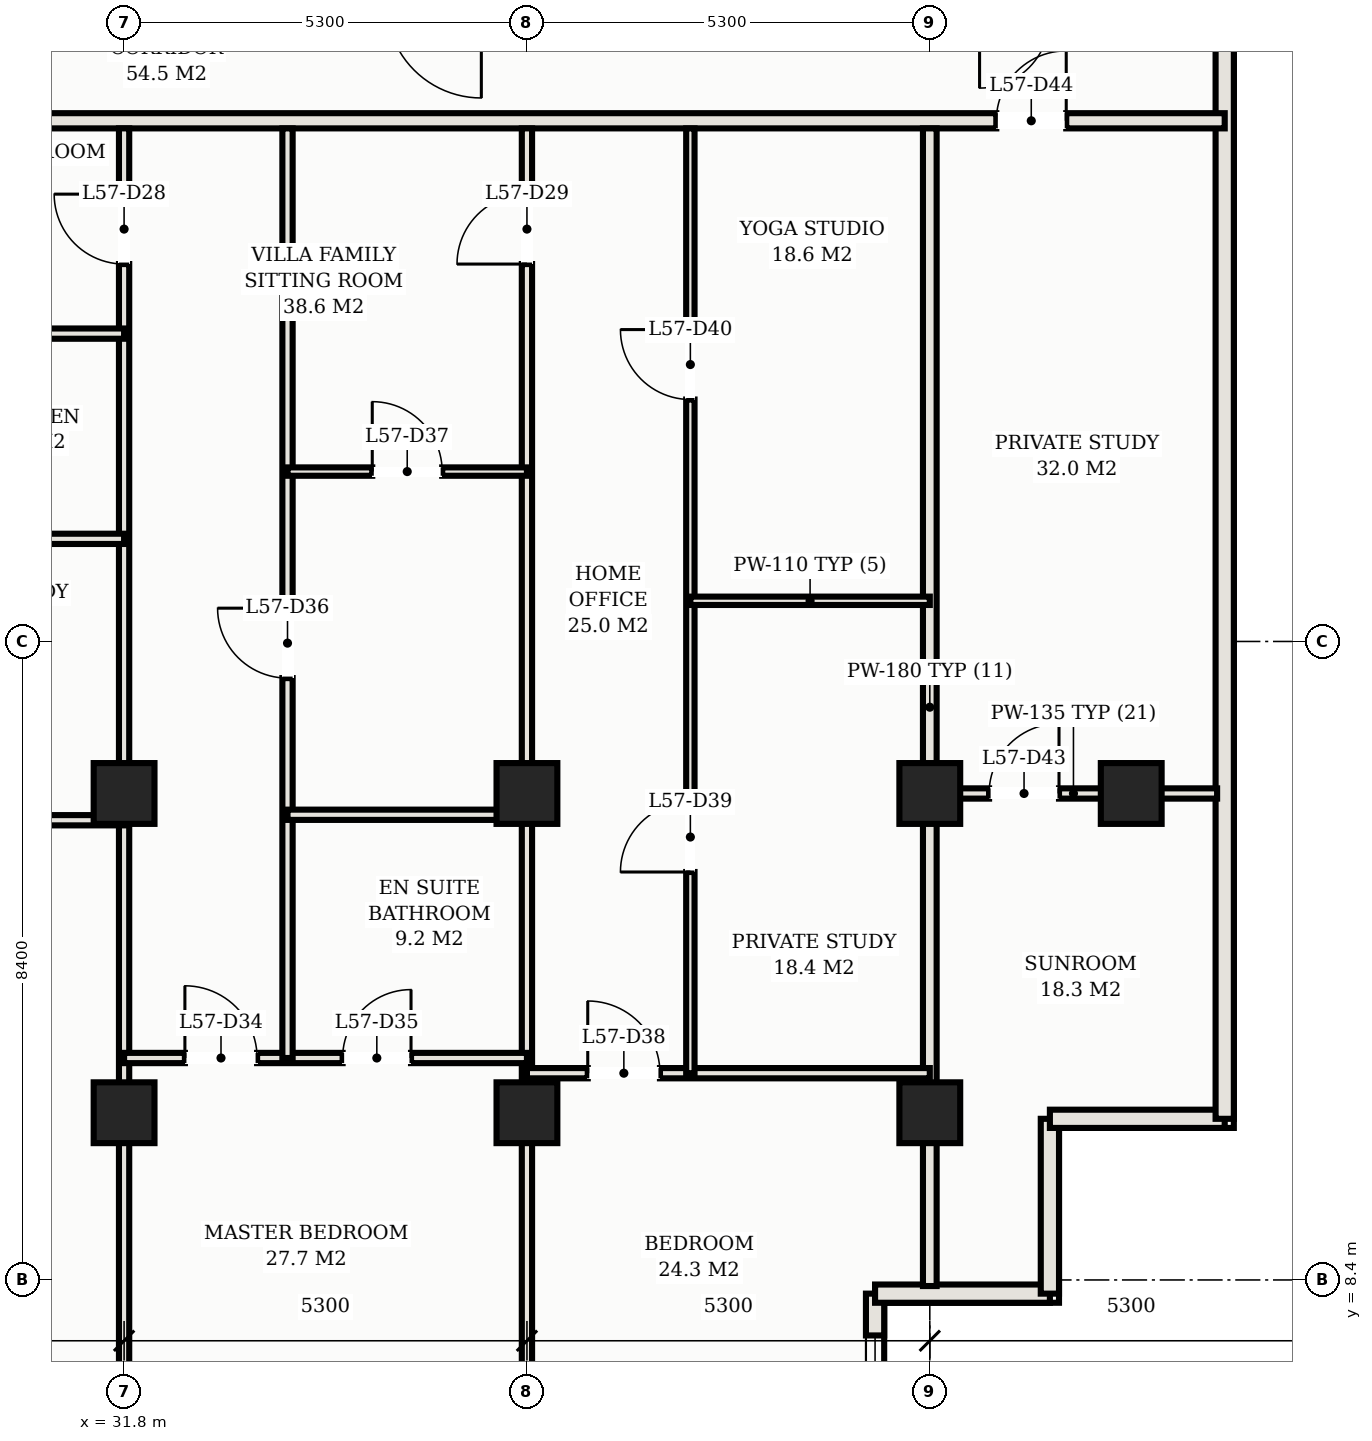
"""IFC4 building model, lengths in metres.
Left out: names, types, materials, properties, quantities, classifications, styles, units other than length and angle.
Written with IfcOpenShell. Run it as: python <this file> out.ifc"""

import sys

from ifc_helpers import new_model, si_unit, direction, frame, frame_2d, origin, origin_2d, place, context, subcontext, project, spatial, rectangle, hollow_rectangle, extrude, element, fill, save


model = new_model("IFC4")
c1 = context("Model", 3, precision=1e-05, world=origin(), true_north=direction((0.0, 1.0)))
c2 = subcontext(c1, "Body", "Model", "MODEL_VIEW")
j1 = project(units=[si_unit("LENGTHUNIT", "METRE"), si_unit("PLANEANGLEUNIT", "RADIAN")], contexts=[c1])
p1 = place(None, origin())
s1 = spatial("IfcSite", under=j1, at=p1, CompositionType="ELEMENT")
p2 = place(p1, origin())
s2 = spatial("IfcBuilding", under=s1, at=p2, CompositionType="ELEMENT")
p3 = place(p2, frame((0.0, 0.0, 209.9)))
s3 = spatial("IfcBuildingStorey", under=s2, at=p3, CompositionType="ELEMENT", Elevation=209.9)
for number, where, z_axis, x_axis in (
    (1, (31.8, 14.8, 0.0), (0.0, 0.0, 1.0), (1.0, 0.0, 0.0)),
    (2, (31.8, 10.6, 0.0), (0.0, 0.0, 1.0), (1.0, 0.0, 0.0)),
    (3, (37.1, 14.8, 0.0), (0.0, 0.0, 1.0), (1.0, 0.0, 0.0)),
    (4, (37.1, 10.6, 0.0), (0.0, 0.0, 1.0), (1.0, 0.0, 0.0)),
    (5, (42.4, 14.8, 0.0), (0.0, 0.0, 1.0), (1.0, 0.0, 0.0)),
    (6, (42.4, 10.6, 0.0), (0.0, 0.0, 1.0), (1.0, 0.0, 0.0)),
    (7, (45.05, 14.8, 0.0), (0.0, 0.0, 1.0), (1.0, 0.0, 0.0)),
):
    element("IfcColumn", number, at=place(p3, frame(where, z_axis=z_axis, x_axis=x_axis)), inside=s3, PredefinedType="COLUMN", context=c2, shape_type="SweptSolid", body=[
        extrude(hollow_rectangle(XDim=0.8, YDim=0.8, WallThickness=0.028, at=origin_2d()), origin(), (0.0, 0.0, 1.0), 3.3),
    ])
p4 = place(p3, frame((41.68, 5.92, 0.0), z_axis=(0.0, 0.0, 1.0), x_axis=(0.0, 1.0, 0.0)))
e8 = element("IfcWall", 8, at=p4, inside=s3, PredefinedType="SOLIDWALL", context=c2, shape_type="SweptSolid", body=[
    extrude(rectangle(XDim=2.3, YDim=0.24, at=frame_2d((1.15, 0.0))), origin(), (0.0, 0.0, 1.0), 3.11),
])
p5 = place(p4, frame((0.55, 0.0, 0.75)))
e9 = element("IfcOpeningElement", 9, at=p5, cuts=e8, PredefinedType="OPENING", context=c2, shape_type="SweptSolid", body=[
    extrude(rectangle(XDim=1.2, YDim=1.5, at=frame_2d((0.6, 0.75))), frame((0.0, 0.13, 0.0), z_axis=(0.0, -1.0, 0.0), x_axis=(1.0, 0.0, 0.0)), (0.0, 0.0, 1.0), 0.26),
])
for number, where, z_axis, x_axis in (
    (10, (41.68, 8.22, 0.0), (0.0, 0.0, 1.0), (1.0, 0.0, 0.0)),
    (11, (43.98, 8.22, 0.0), (0.0, 0.0, 1.0), (0.0, 1.0, 0.0)),
    (12, (43.98, 10.52, 0.0), (0.0, 0.0, 1.0), (1.0, 0.0, 0.0)),
):
    element("IfcWall", number, at=place(p3, frame(where, z_axis=z_axis, x_axis=x_axis)), inside=s3, PredefinedType="SOLIDWALL", context=c2, shape_type="SweptSolid", body=[
        extrude(rectangle(XDim=2.3, YDim=0.24, at=frame_2d((1.15, 0.0))), origin(), (0.0, 0.0, 1.0), 3.11),
    ])
p6 = place(p3, frame((46.28, 10.52, 0.0), z_axis=(0.0, 0.0, 1.0), x_axis=(0.0, 1.0, 0.0)))
e13 = element("IfcWall", 13, at=p6, inside=s3, PredefinedType="SOLIDWALL", context=c2, shape_type="SweptSolid", body=[
    extrude(rectangle(XDim=26.41, YDim=0.24, at=frame_2d((13.205, 0.0))), origin(), (0.0, 0.0, 1.0), 3.11),
])
p7 = place(p6, frame((17.48, 0.0, 0.0)))
e14 = element("IfcOpeningElement", 14, at=p7, cuts=e13, PredefinedType="OPENING", context=c2, shape_type="SweptSolid", body=[
    extrude(rectangle(XDim=1.8, YDim=2.2, at=frame_2d((0.9, 1.1))), frame((0.0, 0.13, 0.0), z_axis=(0.0, -1.0, 0.0), x_axis=(1.0, 0.0, 0.0)), (0.0, 0.0, 1.0), 0.26),
])
p8 = place(p3, frame((6.72, 23.65, 0.0), z_axis=(0.0, 0.0, 1.0), x_axis=(1.0, 0.0, 0.0)))
e15 = element("IfcWall", 15, at=p8, inside=s3, PredefinedType="PARTITIONING", context=c2, shape_type="SweptSolid", body=[
    extrude(rectangle(XDim=39.56, YDim=0.2, at=frame_2d((19.78, 0.0))), origin(), (0.0, 0.0, 1.0), 2.43),
])
p9 = place(p8, frame((4.63, 0.0, 0.0)))
e16 = element("IfcOpeningElement", 16, at=p9, cuts=e15, PredefinedType="OPENING", context=c2, shape_type="SweptSolid", body=[
    extrude(rectangle(XDim=1.1, YDim=2.25, at=frame_2d((0.55, 1.125))), frame((0.0, 0.11, 0.0), z_axis=(0.0, -1.0, 0.0), x_axis=(1.0, 0.0, 0.0)), (0.0, 0.0, 1.0), 0.22),
])
p10 = place(p8, frame((20.53, 0.0, 0.0)))
e17 = element("IfcOpeningElement", 17, at=p10, cuts=e15, PredefinedType="OPENING", context=c2, shape_type="SweptSolid", body=[
    extrude(rectangle(XDim=1.1, YDim=2.25, at=frame_2d((0.55, 1.125))), frame((0.0, 0.11, 0.0), z_axis=(0.0, -1.0, 0.0), x_axis=(1.0, 0.0, 0.0)), (0.0, 0.0, 1.0), 0.22),
])
p11 = place(p8, frame((2.085, 0.0, 0.0)))
e18 = element("IfcOpeningElement", 18, at=p11, cuts=e15, PredefinedType="OPENING", context=c2, shape_type="SweptSolid", body=[
    extrude(rectangle(XDim=0.92, YDim=2.15, at=frame_2d((0.46, 1.075))), frame((0.0, 0.11, 0.0), z_axis=(0.0, -1.0, 0.0), x_axis=(1.0, 0.0, 0.0)), (0.0, 0.0, 1.0), 0.22),
])
p12 = place(p8, frame((36.555, 0.0, 0.0)))
e19 = element("IfcOpeningElement", 19, at=p12, cuts=e15, PredefinedType="OPENING", context=c2, shape_type="SweptSolid", body=[
    extrude(rectangle(XDim=0.92, YDim=2.15, at=frame_2d((0.46, 1.075))), frame((0.0, 0.11, 0.0), z_axis=(0.0, -1.0, 0.0), x_axis=(1.0, 0.0, 0.0)), (0.0, 0.0, 1.0), 0.22),
])
p13 = place(p3, frame((42.4, 8.32, 0.0), z_axis=(0.0, 0.0, 1.0), x_axis=(0.0, 1.0, 0.0)))
e20 = element("IfcWall", 20, at=p13, inside=s3, PredefinedType="PARTITIONING", context=c2, shape_type="SweptSolid", body=[
    extrude(rectangle(XDim=15.23, YDim=0.18, at=frame_2d((7.615, 0.0))), origin(), (0.0, 0.0, 1.0), 2.43),
])
p14 = place(p3, frame((31.8, 5.331, 0.0), z_axis=(0.0, 0.0, 1.0), x_axis=(0.0, 1.0, 0.0)))
e21 = element("IfcWall", 21, at=p14, inside=s3, PredefinedType="PARTITIONING", context=c2, shape_type="SweptSolid", body=[
    extrude(rectangle(XDim=18.219, YDim=0.135, at=frame_2d((9.109, 0.0))), origin(), (0.0, 0.0, 1.0), 2.43),
])
p15 = place(p14, frame((16.434, 0.0, 0.0)))
e22 = element("IfcOpeningElement", 22, at=p15, cuts=e21, PredefinedType="OPENING", context=c2, shape_type="SweptSolid", body=[
    extrude(rectangle(XDim=0.92, YDim=2.15, at=frame_2d((0.46, 1.075))), frame((0.0, 0.078, 0.0), z_axis=(0.0, -1.0, 0.0), x_axis=(1.0, 0.0, 0.0)), (0.0, 0.0, 1.0), 0.155),
])
p16 = place(p3, frame((37.1, 6.02, 0.0), z_axis=(0.0, 0.0, 1.0), x_axis=(0.0, 1.0, 0.0)))
e23 = element("IfcWall", 23, at=p16, inside=s3, PredefinedType="PARTITIONING", context=c2, shape_type="SweptSolid", body=[
    extrude(rectangle(XDim=17.53, YDim=0.135, at=frame_2d((8.765, 0.0))), origin(), (0.0, 0.0, 1.0), 2.43),
])
p17 = place(p16, frame((15.745, 0.0, 0.0)))
e24 = element("IfcOpeningElement", 24, at=p17, cuts=e23, PredefinedType="OPENING", context=c2, shape_type="SweptSolid", body=[
    extrude(rectangle(XDim=0.92, YDim=2.15, at=frame_2d((0.46, 1.075))), frame((0.0, 0.078, 0.0), z_axis=(0.0, -1.0, 0.0), x_axis=(1.0, 0.0, 0.0)), (0.0, 0.0, 1.0), 0.155),
])
p18 = place(p3, frame((26.5, 14.448, 0.0), z_axis=(0.0, 0.0, 1.0), x_axis=(1.0, 0.0, 0.0)))
e25 = element("IfcWall", 25, at=p18, inside=s3, PredefinedType="PARTITIONING", context=c2, shape_type="SweptSolid", body=[
    extrude(rectangle(XDim=5.3, YDim=0.135, at=frame_2d((2.65, 0.0))), origin(), (0.0, 0.0, 1.0), 2.43),
])
p19 = place(p18, frame((0.815, 0.0, 0.0)))
e26 = element("IfcOpeningElement", 26, at=p19, cuts=e25, PredefinedType="OPENING", context=c2, shape_type="SweptSolid", body=[
    extrude(rectangle(XDim=0.92, YDim=2.15, at=frame_2d((0.46, 1.075))), frame((0.0, 0.078, 0.0), z_axis=(0.0, -1.0, 0.0), x_axis=(1.0, 0.0, 0.0)), (0.0, 0.0, 1.0), 0.155),
])
for number, where, z_axis, x_axis in (
    (27, (28.65, 18.15, 0.0), (0.0, 0.0, 1.0), (1.0, 0.0, 0.0)),
    (28, (28.65, 20.85, 0.0), (0.0, 0.0, 1.0), (1.0, 0.0, 0.0)),
):
    element("IfcWall", number, at=place(p3, frame(where, z_axis=z_axis, x_axis=x_axis)), inside=s3, PredefinedType="PARTITIONING", context=c2, shape_type="SweptSolid", body=[
        extrude(rectangle(XDim=3.15, YDim=0.135, at=frame_2d((1.575, 0.0))), origin(), (0.0, 0.0, 1.0), 2.43),
    ])
p20 = place(p3, frame((31.8, 11.32, 0.0), z_axis=(0.0, 0.0, 1.0), x_axis=(1.0, 0.0, 0.0)))
e29 = element("IfcWall", 29, at=p20, inside=s3, PredefinedType="PARTITIONING", context=c2, shape_type="SweptSolid", body=[
    extrude(rectangle(XDim=5.3, YDim=0.135, at=frame_2d((2.65, 0.0))), origin(), (0.0, 0.0, 1.0), 2.43),
])
p21 = place(p20, frame((0.8, 0.0, 0.0)))
e30 = element("IfcOpeningElement", 30, at=p21, cuts=e29, PredefinedType="OPENING", context=c2, shape_type="SweptSolid", body=[
    extrude(rectangle(XDim=0.95, YDim=2.15, at=frame_2d((0.475, 1.075))), frame((0.0, 0.078, 0.0), z_axis=(0.0, -1.0, 0.0), x_axis=(1.0, 0.0, 0.0)), (0.0, 0.0, 1.0), 0.155),
])
p22 = place(p20, frame((2.875, 0.0, 0.0)))
e31 = element("IfcOpeningElement", 31, at=p22, cuts=e29, PredefinedType="OPENING", context=c2, shape_type="SweptSolid", body=[
    extrude(rectangle(XDim=0.9, YDim=2.15, at=frame_2d((0.45, 1.075))), frame((0.0, 0.078, 0.0), z_axis=(0.0, -1.0, 0.0), x_axis=(1.0, 0.0, 0.0)), (0.0, 0.0, 1.0), 0.155),
])
p23 = place(p3, frame((33.95, 11.32, 0.0), z_axis=(0.0, 0.0, 1.0), x_axis=(0.0, 1.0, 0.0)))
e32 = element("IfcWall", 32, at=p23, inside=s3, PredefinedType="PARTITIONING", context=c2, shape_type="SweptSolid", body=[
    extrude(rectangle(XDim=12.23, YDim=0.135, at=frame_2d((6.115, 0.0))), origin(), (0.0, 0.0, 1.0), 2.43),
])
p24 = place(p23, frame((4.998, 0.0, 0.0)))
e33 = element("IfcOpeningElement", 33, at=p24, cuts=e32, PredefinedType="OPENING", context=c2, shape_type="SweptSolid", body=[
    extrude(rectangle(XDim=0.92, YDim=2.15, at=frame_2d((0.46, 1.075))), frame((0.0, 0.078, 0.0), z_axis=(0.0, -1.0, 0.0), x_axis=(1.0, 0.0, 0.0)), (0.0, 0.0, 1.0), 0.155),
])
p25 = place(p3, frame((33.95, 14.52, 0.0), z_axis=(0.0, 0.0, 1.0), x_axis=(1.0, 0.0, 0.0)))
e34 = element("IfcWall", 34, at=p25, inside=s3, PredefinedType="PARTITIONING", context=c2, shape_type="SweptSolid", body=[
    extrude(rectangle(XDim=3.15, YDim=0.135, at=frame_2d((1.575, 0.0))), origin(), (0.0, 0.0, 1.0), 2.43),
])
p26 = place(p3, frame((33.95, 19.035, 0.0), z_axis=(0.0, 0.0, 1.0), x_axis=(1.0, 0.0, 0.0)))
e35 = element("IfcWall", 35, at=p26, inside=s3, PredefinedType="MOVABLE", context=c2, shape_type="SweptSolid", body=[
    extrude(rectangle(XDim=3.15, YDim=0.11, at=frame_2d((1.575, 0.0))), origin(), (0.0, 0.0, 1.0), 2.43),
])
p27 = place(p26, frame((1.115, 0.0, 0.0)))
e36 = element("IfcOpeningElement", 36, at=p27, cuts=e35, PredefinedType="OPENING", context=c2, shape_type="SweptSolid", body=[
    extrude(rectangle(XDim=0.92, YDim=2.15, at=frame_2d((0.46, 1.075))), frame((0.0, 0.065, 0.0), z_axis=(0.0, -1.0, 0.0), x_axis=(1.0, 0.0, 0.0)), (0.0, 0.0, 1.0), 0.13),
])
p28 = place(p3, frame((37.1, 11.12, 0.0), z_axis=(0.0, 0.0, 1.0), x_axis=(1.0, 0.0, 0.0)))
e37 = element("IfcWall", 37, at=p28, inside=s3, PredefinedType="PARTITIONING", context=c2, shape_type="SweptSolid", body=[
    extrude(rectangle(XDim=5.3, YDim=0.135, at=frame_2d((2.65, 0.0))), origin(), (0.0, 0.0, 1.0), 2.43),
])
p29 = place(p28, frame((0.8, 0.0, 0.0)))
e38 = element("IfcOpeningElement", 38, at=p29, cuts=e37, PredefinedType="OPENING", context=c2, shape_type="SweptSolid", body=[
    extrude(rectangle(XDim=0.95, YDim=2.15, at=frame_2d((0.475, 1.075))), frame((0.0, 0.078, 0.0), z_axis=(0.0, -1.0, 0.0), x_axis=(1.0, 0.0, 0.0)), (0.0, 0.0, 1.0), 0.155),
])
p30 = place(p3, frame((39.25, 11.12, 0.0), z_axis=(0.0, 0.0, 1.0), x_axis=(0.0, 1.0, 0.0)))
e39 = element("IfcWall", 39, at=p30, inside=s3, PredefinedType="MOVABLE", context=c2, shape_type="SweptSolid", body=[
    extrude(rectangle(XDim=12.43, YDim=0.11, at=frame_2d((6.215, 0.0))), origin(), (0.0, 0.0, 1.0), 2.43),
])
p31 = place(p30, frame((2.647, 0.0, 0.0)))
e40 = element("IfcOpeningElement", 40, at=p31, cuts=e39, PredefinedType="OPENING", context=c2, shape_type="SweptSolid", body=[
    extrude(rectangle(XDim=0.92, YDim=2.15, at=frame_2d((0.46, 1.075))), frame((0.0, 0.065, 0.0), z_axis=(0.0, -1.0, 0.0), x_axis=(1.0, 0.0, 0.0)), (0.0, 0.0, 1.0), 0.13),
])
p32 = place(p30, frame((8.863, 0.0, 0.0)))
e41 = element("IfcOpeningElement", 41, at=p32, cuts=e39, PredefinedType="OPENING", context=c2, shape_type="SweptSolid", body=[
    extrude(rectangle(XDim=0.92, YDim=2.15, at=frame_2d((0.46, 1.075))), frame((0.0, 0.065, 0.0), z_axis=(0.0, -1.0, 0.0), x_axis=(1.0, 0.0, 0.0)), (0.0, 0.0, 1.0), 0.13),
])
p33 = place(p3, frame((39.25, 17.335, 0.0), z_axis=(0.0, 0.0, 1.0), x_axis=(1.0, 0.0, 0.0)))
e42 = element("IfcWall", 42, at=p33, inside=s3, PredefinedType="MOVABLE", context=c2, shape_type="SweptSolid", body=[
    extrude(rectangle(XDim=3.15, YDim=0.11, at=frame_2d((1.575, 0.0))), origin(), (0.0, 0.0, 1.0), 2.43),
])
p34 = place(p3, frame((42.4, 14.8, 0.0), z_axis=(0.0, 0.0, 1.0), x_axis=(1.0, 0.0, 0.0)))
e43 = element("IfcWall", 43, at=p34, inside=s3, PredefinedType="PARTITIONING", context=c2, shape_type="SweptSolid", body=[
    extrude(rectangle(XDim=3.78, YDim=0.135, at=frame_2d((1.89, 0.0))), origin(), (0.0, 0.0, 1.0), 2.43),
])
p35 = place(p34, frame((0.78, 0.0, 0.0)))
e44 = element("IfcOpeningElement", 44, at=p35, cuts=e43, PredefinedType="OPENING", context=c2, shape_type="SweptSolid", body=[
    extrude(rectangle(XDim=0.92, YDim=2.15, at=frame_2d((0.46, 1.075))), frame((0.0, 0.078, 0.0), z_axis=(0.0, -1.0, 0.0), x_axis=(1.0, 0.0, 0.0)), (0.0, 0.0, 1.0), 0.155),
])
p36 = place(p5, origin())
e45 = element("IfcWindow", 45, at=p36, inside=s3, PartitioningType="SINGLE_PANEL", PredefinedType="WINDOW", context=c2, shape_type="SweptSolid", body=[
    extrude(rectangle(XDim=1.2, YDim=1.5, at=frame_2d((0.6, 0.75))), frame((0.0, 0.03, 0.0), z_axis=(0.0, -1.0, 0.0), x_axis=(1.0, 0.0, 0.0)), (0.0, 0.0, 1.0), 0.06),
])
fill(e9, e45)
p37 = place(p15, origin())
e46 = element("IfcDoor", 46, at=p37, inside=s3, OperationType="SINGLE_SWING_RIGHT", PredefinedType="DOOR", context=c2, shape_type="SweptSolid", body=[
    extrude(rectangle(XDim=0.92, YDim=2.15, at=frame_2d((0.46, 1.075))), frame((0.0, 0.025, 0.0), z_axis=(0.0, -1.0, 0.0), x_axis=(1.0, 0.0, 0.0)), (0.0, 0.0, 1.0), 0.05),
])
fill(e22, e46)
p38 = place(p17, origin())
e47 = element("IfcDoor", 47, at=p38, inside=s3, OperationType="SINGLE_SWING_LEFT", PredefinedType="DOOR", context=c2, shape_type="SweptSolid", body=[
    extrude(rectangle(XDim=0.92, YDim=2.15, at=frame_2d((0.46, 1.075))), frame((0.0, 0.025, 0.0), z_axis=(0.0, -1.0, 0.0), x_axis=(1.0, 0.0, 0.0)), (0.0, 0.0, 1.0), 0.05),
])
fill(e24, e47)
p39 = place(p21, origin())
e48 = element("IfcDoor", 48, at=p39, inside=s3, OperationType="SINGLE_SWING_LEFT", PredefinedType="DOOR", context=c2, shape_type="SweptSolid", body=[
    extrude(rectangle(XDim=0.95, YDim=2.15, at=frame_2d((0.475, 1.075))), frame((0.0, 0.025, 0.0), z_axis=(0.0, -1.0, 0.0), x_axis=(1.0, 0.0, 0.0)), (0.0, 0.0, 1.0), 0.05),
])
fill(e30, e48)
p40 = place(p22, origin())
e49 = element("IfcDoor", 49, at=p40, inside=s3, OperationType="SINGLE_SWING_RIGHT", PredefinedType="DOOR", context=c2, shape_type="SweptSolid", body=[
    extrude(rectangle(XDim=0.9, YDim=2.15, at=frame_2d((0.45, 1.075))), frame((0.0, 0.025, 0.0), z_axis=(0.0, -1.0, 0.0), x_axis=(1.0, 0.0, 0.0)), (0.0, 0.0, 1.0), 0.05),
])
fill(e31, e49)
p41 = place(p24, origin())
e50 = element("IfcDoor", 50, at=p41, inside=s3, OperationType="SINGLE_SWING_RIGHT", PredefinedType="DOOR", context=c2, shape_type="SweptSolid", body=[
    extrude(rectangle(XDim=0.92, YDim=2.15, at=frame_2d((0.46, 1.075))), frame((0.0, 0.025, 0.0), z_axis=(0.0, -1.0, 0.0), x_axis=(1.0, 0.0, 0.0)), (0.0, 0.0, 1.0), 0.05),
])
fill(e33, e50)
p42 = place(p27, origin())
e51 = element("IfcDoor", 51, at=p42, inside=s3, OperationType="SINGLE_SWING_LEFT", PredefinedType="DOOR", context=c2, shape_type="SweptSolid", body=[
    extrude(rectangle(XDim=0.92, YDim=2.15, at=frame_2d((0.46, 1.075))), frame((0.0, 0.025, 0.0), z_axis=(0.0, -1.0, 0.0), x_axis=(1.0, 0.0, 0.0)), (0.0, 0.0, 1.0), 0.05),
])
fill(e36, e51)
p43 = place(p29, origin())
e52 = element("IfcDoor", 52, at=p43, inside=s3, OperationType="SINGLE_SWING_LEFT", PredefinedType="DOOR", context=c2, shape_type="SweptSolid", body=[
    extrude(rectangle(XDim=0.95, YDim=2.15, at=frame_2d((0.475, 1.075))), frame((0.0, 0.025, 0.0), z_axis=(0.0, -1.0, 0.0), x_axis=(1.0, 0.0, 0.0)), (0.0, 0.0, 1.0), 0.05),
])
fill(e38, e52)
p44 = place(p31, origin())
e53 = element("IfcDoor", 53, at=p44, inside=s3, OperationType="SINGLE_SWING_LEFT", PredefinedType="DOOR", context=c2, shape_type="SweptSolid", body=[
    extrude(rectangle(XDim=0.92, YDim=2.15, at=frame_2d((0.46, 1.075))), frame((0.0, 0.025, 0.0), z_axis=(0.0, -1.0, 0.0), x_axis=(1.0, 0.0, 0.0)), (0.0, 0.0, 1.0), 0.05),
])
fill(e40, e53)
p45 = place(p32, origin())
e54 = element("IfcDoor", 54, at=p45, inside=s3, OperationType="SINGLE_SWING_RIGHT", PredefinedType="DOOR", context=c2, shape_type="SweptSolid", body=[
    extrude(rectangle(XDim=0.92, YDim=2.15, at=frame_2d((0.46, 1.075))), frame((0.0, 0.025, 0.0), z_axis=(0.0, -1.0, 0.0), x_axis=(1.0, 0.0, 0.0)), (0.0, 0.0, 1.0), 0.05),
])
fill(e41, e54)
p46 = place(p35, origin())
e55 = element("IfcDoor", 55, at=p46, inside=s3, OperationType="SINGLE_SWING_RIGHT", PredefinedType="DOOR", context=c2, shape_type="SweptSolid", body=[
    extrude(rectangle(XDim=0.92, YDim=2.15, at=frame_2d((0.46, 1.075))), frame((0.0, 0.025, 0.0), z_axis=(0.0, -1.0, 0.0), x_axis=(1.0, 0.0, 0.0)), (0.0, 0.0, 1.0), 0.05),
])
fill(e44, e55)
p47 = place(p12, origin())
e56 = element("IfcDoor", 56, at=p47, inside=s3, OperationType="SINGLE_SWING_RIGHT", PredefinedType="DOOR", context=c2, shape_type="SweptSolid", body=[
    extrude(rectangle(XDim=0.92, YDim=2.15, at=frame_2d((0.46, 1.075))), frame((0.0, 0.025, 0.0), z_axis=(0.0, -1.0, 0.0), x_axis=(1.0, 0.0, 0.0)), (0.0, 0.0, 1.0), 0.05),
])
fill(e19, e56)
save(model, sys.argv[1])
